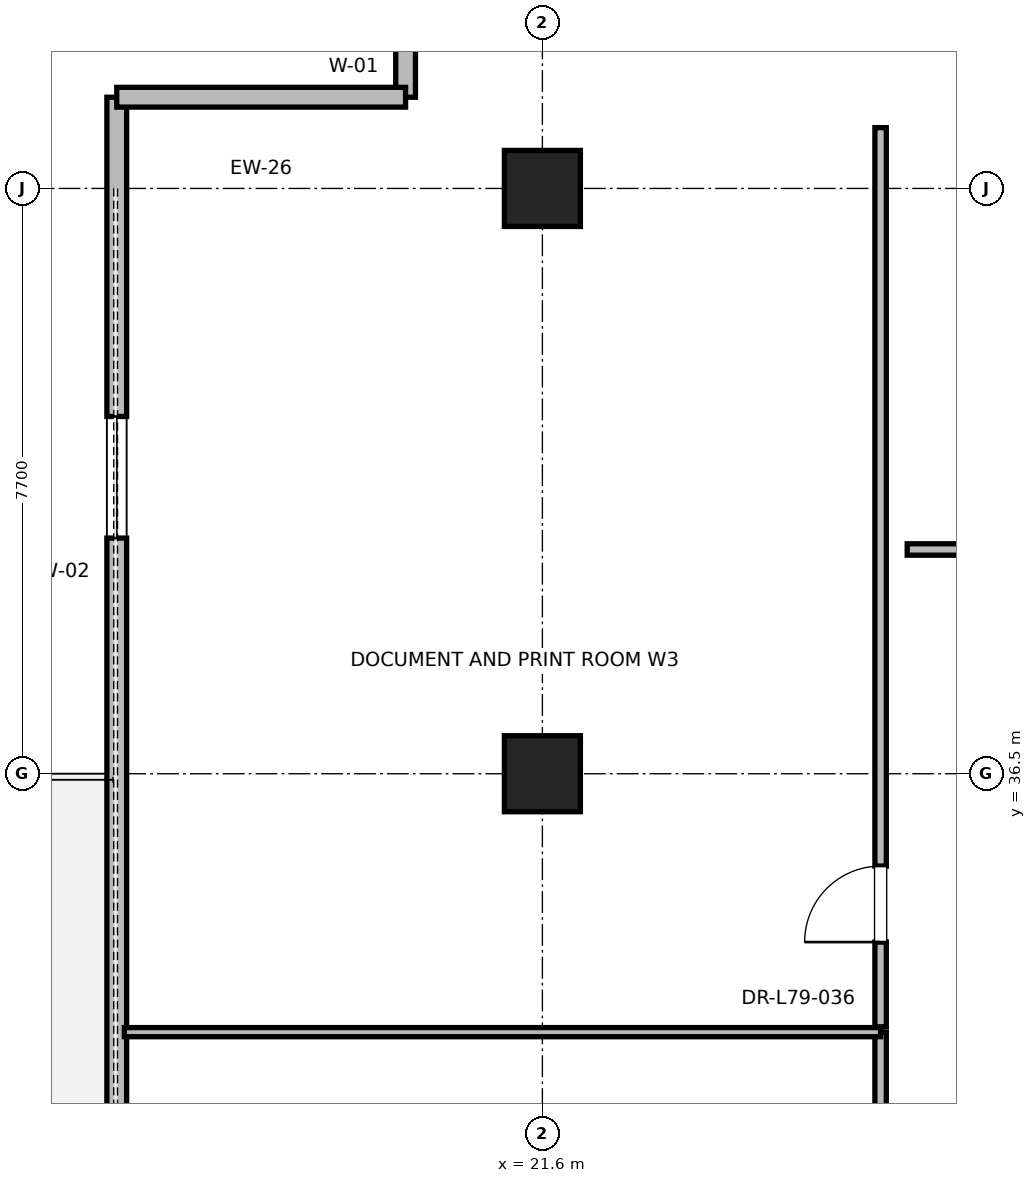
"""IFC4 building model, lengths in metres.
Left out: names, types, materials, properties, quantities, classifications, styles, units other than length and angle.
Written with IfcOpenShell. Run it as: python <this file> out.ifc"""

import sys

from ifc_helpers import new_model, si_unit, direction, frame, frame_2d, origin, origin_2d, place, context, subcontext, project, spatial, rectangle, extrude, element, fill, save


model = new_model("IFC4")
c1 = context("Model", 3, precision=1e-05, world=origin(), true_north=direction((0.0, 1.0)))
c2 = subcontext(c1, "Body", "Model", "MODEL_VIEW")
j1 = project(units=[si_unit("LENGTHUNIT", "METRE"), si_unit("PLANEANGLEUNIT", "RADIAN")], contexts=[c1])
p1 = place(None, origin())
s1 = spatial("IfcSite", under=j1, at=p1, CompositionType="ELEMENT")
p2 = place(p1, origin())
s2 = spatial("IfcBuilding", under=s1, at=p2, CompositionType="ELEMENT")
p3 = place(p2, frame((0.0, 0.0, 338.8)))
s3 = spatial("IfcBuildingStorey", under=s2, at=p3, CompositionType="ELEMENT", Elevation=338.8)
for number, where, z_axis, x_axis in (
    (1, (21.6, 36.5, 0.0), (0.0, 0.0, 1.0), (1.0, 0.0, 0.0)),
    (2, (21.6, 44.2, 0.0), (0.0, 0.0, 1.0), (1.0, 0.0, 0.0)),
):
    element("IfcColumn", number, at=place(p3, frame(where, z_axis=z_axis, x_axis=x_axis)), inside=s3, PredefinedType="COLUMN", context=c2, shape_type="SweptSolid", body=[
        extrude(rectangle(XDim=1.0, YDim=1.0, at=origin_2d()), origin(), (0.0, 0.0, 1.0), 4.0),
    ])
p4 = place(p3, frame((16.0, 45.4, 0.0), z_axis=(0.0, 0.0, 1.0), x_axis=(0.0, -1.0, 0.0)))
e3 = element("IfcWall", 3, at=p4, inside=s3, PredefinedType="PARAPET", context=c2, shape_type="SweptSolid", body=[
    extrude(rectangle(XDim=35.8, YDim=0.26, at=frame_2d((17.9, 0.0))), origin(), (0.0, 0.0, 1.0), 3.7),
])
p5 = place(p4, frame((4.2, 0.0, 0.85)))
e4 = element("IfcOpeningElement", 4, at=p5, cuts=e3, PredefinedType="OPENING", context=c2, shape_type="SweptSolid", body=[
    extrude(rectangle(XDim=1.6, YDim=2.1, at=frame_2d((0.8, 1.05))), frame((0.0, 0.13, 0.0), z_axis=(0.0, -1.0, 0.0), x_axis=(1.0, 0.0, 0.0)), (0.0, 0.0, 1.0), 0.26),
])
p6 = place(p4, frame((17.3, 0.0, 0.0)))
e5 = element("IfcOpeningElement", 5, at=p6, cuts=e3, PredefinedType="OPENING", context=c2, shape_type="SweptSolid", body=[
    extrude(rectangle(XDim=1.2, YDim=2.2, at=frame_2d((0.6, 1.1))), frame((0.0, 0.13, 0.0), z_axis=(0.0, -1.0, 0.0), x_axis=(1.0, 0.0, 0.0)), (0.0, 0.0, 1.0), 0.26),
])
p7 = place(p4, frame((30.0, 0.0, 0.85)))
e6 = element("IfcOpeningElement", 6, at=p7, cuts=e3, PredefinedType="OPENING", context=c2, shape_type="SweptSolid", body=[
    extrude(rectangle(XDim=1.6, YDim=2.1, at=frame_2d((0.8, 1.05))), frame((0.0, 0.13, 0.0), z_axis=(0.0, -1.0, 0.0), x_axis=(1.0, 0.0, 0.0)), (0.0, 0.0, 1.0), 0.26),
])
p8 = place(p3, frame((19.8, 48.7, 0.0), z_axis=(0.0, 0.0, 1.0), x_axis=(0.0, -1.0, 0.0)))
e7 = element("IfcWall", 7, at=p8, inside=s3, PredefinedType="PARAPET", context=c2, shape_type="SweptSolid", body=[
    extrude(rectangle(XDim=3.3, YDim=0.26, at=frame_2d((1.65, 0.0))), origin(), (0.0, 0.0, 1.0), 3.7),
])
p9 = place(p8, frame((0.95, 0.0, 0.85)))
e8 = element("IfcOpeningElement", 8, at=p9, cuts=e7, PredefinedType="OPENING", context=c2, shape_type="SweptSolid", body=[
    extrude(rectangle(XDim=1.4, YDim=2.0, at=frame_2d((0.7, 1.0))), frame((0.0, 0.13, 0.0), z_axis=(0.0, -1.0, 0.0), x_axis=(1.0, 0.0, 0.0)), (0.0, 0.0, 1.0), 0.26),
])
p10 = place(p3, frame((19.8, 45.4, 0.0), z_axis=(0.0, 0.0, 1.0), x_axis=(-1.0, 0.0, 0.0)))
e9 = element("IfcWall", 9, at=p10, inside=s3, PredefinedType="PARAPET", context=c2, shape_type="SweptSolid", body=[
    extrude(rectangle(XDim=3.8, YDim=0.26, at=frame_2d((1.9, 0.0))), origin(), (0.0, 0.0, 1.0), 3.7),
])
p11 = place(p3, frame((26.4, 39.45, 0.0), z_axis=(0.0, 0.0, 1.0), x_axis=(1.0, 0.0, 0.0)))
e10 = element("IfcWall", 10, at=p11, inside=s3, PredefinedType="PARTITIONING", context=c2, shape_type="SweptSolid", body=[
    extrude(rectangle(XDim=3.808, YDim=0.15, at=frame_2d((1.904, 0.0))), origin(), (0.0, 0.0, 1.0), 2.753),
])
p12 = place(p11, frame((1.419, 0.0, 0.0)))
e11 = element("IfcOpeningElement", 11, at=p12, cuts=e10, PredefinedType="OPENING", context=c2, shape_type="SweptSolid", body=[
    extrude(rectangle(XDim=1.0, YDim=2.15, at=frame_2d((0.5, 1.075))), frame((0.0, 0.075, 0.0), z_axis=(0.0, -1.0, 0.0), x_axis=(1.0, 0.0, 0.0)), (0.0, 0.0, 1.0), 0.15),
])
p13 = place(p3, frame((26.05, 19.52, 0.0), z_axis=(0.0, 0.0, 1.0), x_axis=(0.0, 1.0, 0.0)))
e12 = element("IfcWall", 12, at=p13, inside=s3, PredefinedType="PARTITIONING", context=c2, shape_type="SweptSolid", body=[
    extrude(rectangle(XDim=13.58, YDim=0.15, at=frame_2d((6.79, 0.0))), origin(), (0.0, 0.0, 1.0), 2.85),
])
p14 = place(p13, frame((6.255, 0.0, 0.0)))
e13 = element("IfcOpeningElement", 13, at=p14, cuts=e12, PredefinedType="OPENING", context=c2, shape_type="SweptSolid", body=[
    extrude(rectangle(XDim=1.0, YDim=2.15, at=frame_2d((0.5, 1.075))), frame((0.0, 0.075, 0.0), z_axis=(0.0, -1.0, 0.0), x_axis=(1.0, 0.0, 0.0)), (0.0, 0.0, 1.0), 0.15),
])
p15 = place(p3, frame((16.1, 33.1, 0.0), z_axis=(0.0, 0.0, 1.0), x_axis=(1.0, 0.0, 0.0)))
e14 = element("IfcWall", 14, at=p15, inside=s3, PredefinedType="PARTITIONING", context=c2, shape_type="SweptSolid", body=[
    extrude(rectangle(XDim=9.95, YDim=0.12, at=frame_2d((4.975, 0.0))), origin(), (0.0, 0.0, 1.0), 2.753),
])
p16 = place(p3, frame((26.05, 33.17, 0.0), z_axis=(0.0, 0.0, 1.0), x_axis=(0.0, 1.0, 0.0)))
e15 = element("IfcWall", 15, at=p16, inside=s3, PredefinedType="PARTITIONING", context=c2, shape_type="SweptSolid", body=[
    extrude(rectangle(XDim=11.83, YDim=0.15, at=frame_2d((5.915, 0.0))), origin(), (0.0, 0.0, 1.0), 2.753),
])
p17 = place(p16, frame((1.115, 0.0, 0.0)))
e16 = element("IfcOpeningElement", 16, at=p17, cuts=e15, PredefinedType="OPENING", context=c2, shape_type="SweptSolid", body=[
    extrude(rectangle(XDim=1.0, YDim=2.15, at=frame_2d((0.5, 1.075))), frame((0.0, 0.075, 0.0), z_axis=(0.0, -1.0, 0.0), x_axis=(1.0, 0.0, 0.0)), (0.0, 0.0, 1.0), 0.15),
])
p18 = place(p5, origin())
e17 = element("IfcWindow", 17, at=p18, inside=s3, PartitioningType="SINGLE_PANEL", PredefinedType="WINDOW", context=c2, shape_type="SweptSolid", body=[
    extrude(rectangle(XDim=1.6, YDim=2.1, at=frame_2d((0.8, 1.05))), frame((0.0, 0.03, 0.0), z_axis=(0.0, -1.0, 0.0), x_axis=(1.0, 0.0, 0.0)), (0.0, 0.0, 1.0), 0.06),
])
fill(e4, e17)
p19 = place(p17, origin())
e18 = element("IfcDoor", 18, at=p19, inside=s3, OperationType="SINGLE_SWING_LEFT", PredefinedType="DOOR", context=c2, shape_type="SweptSolid", body=[
    extrude(rectangle(XDim=1.0, YDim=2.15, at=frame_2d((0.5, 1.075))), frame((0.0, 0.025, 0.0), z_axis=(0.0, -1.0, 0.0), x_axis=(1.0, 0.0, 0.0)), (0.0, 0.0, 1.0), 0.05),
])
fill(e16, e18)
save(model, sys.argv[1])
